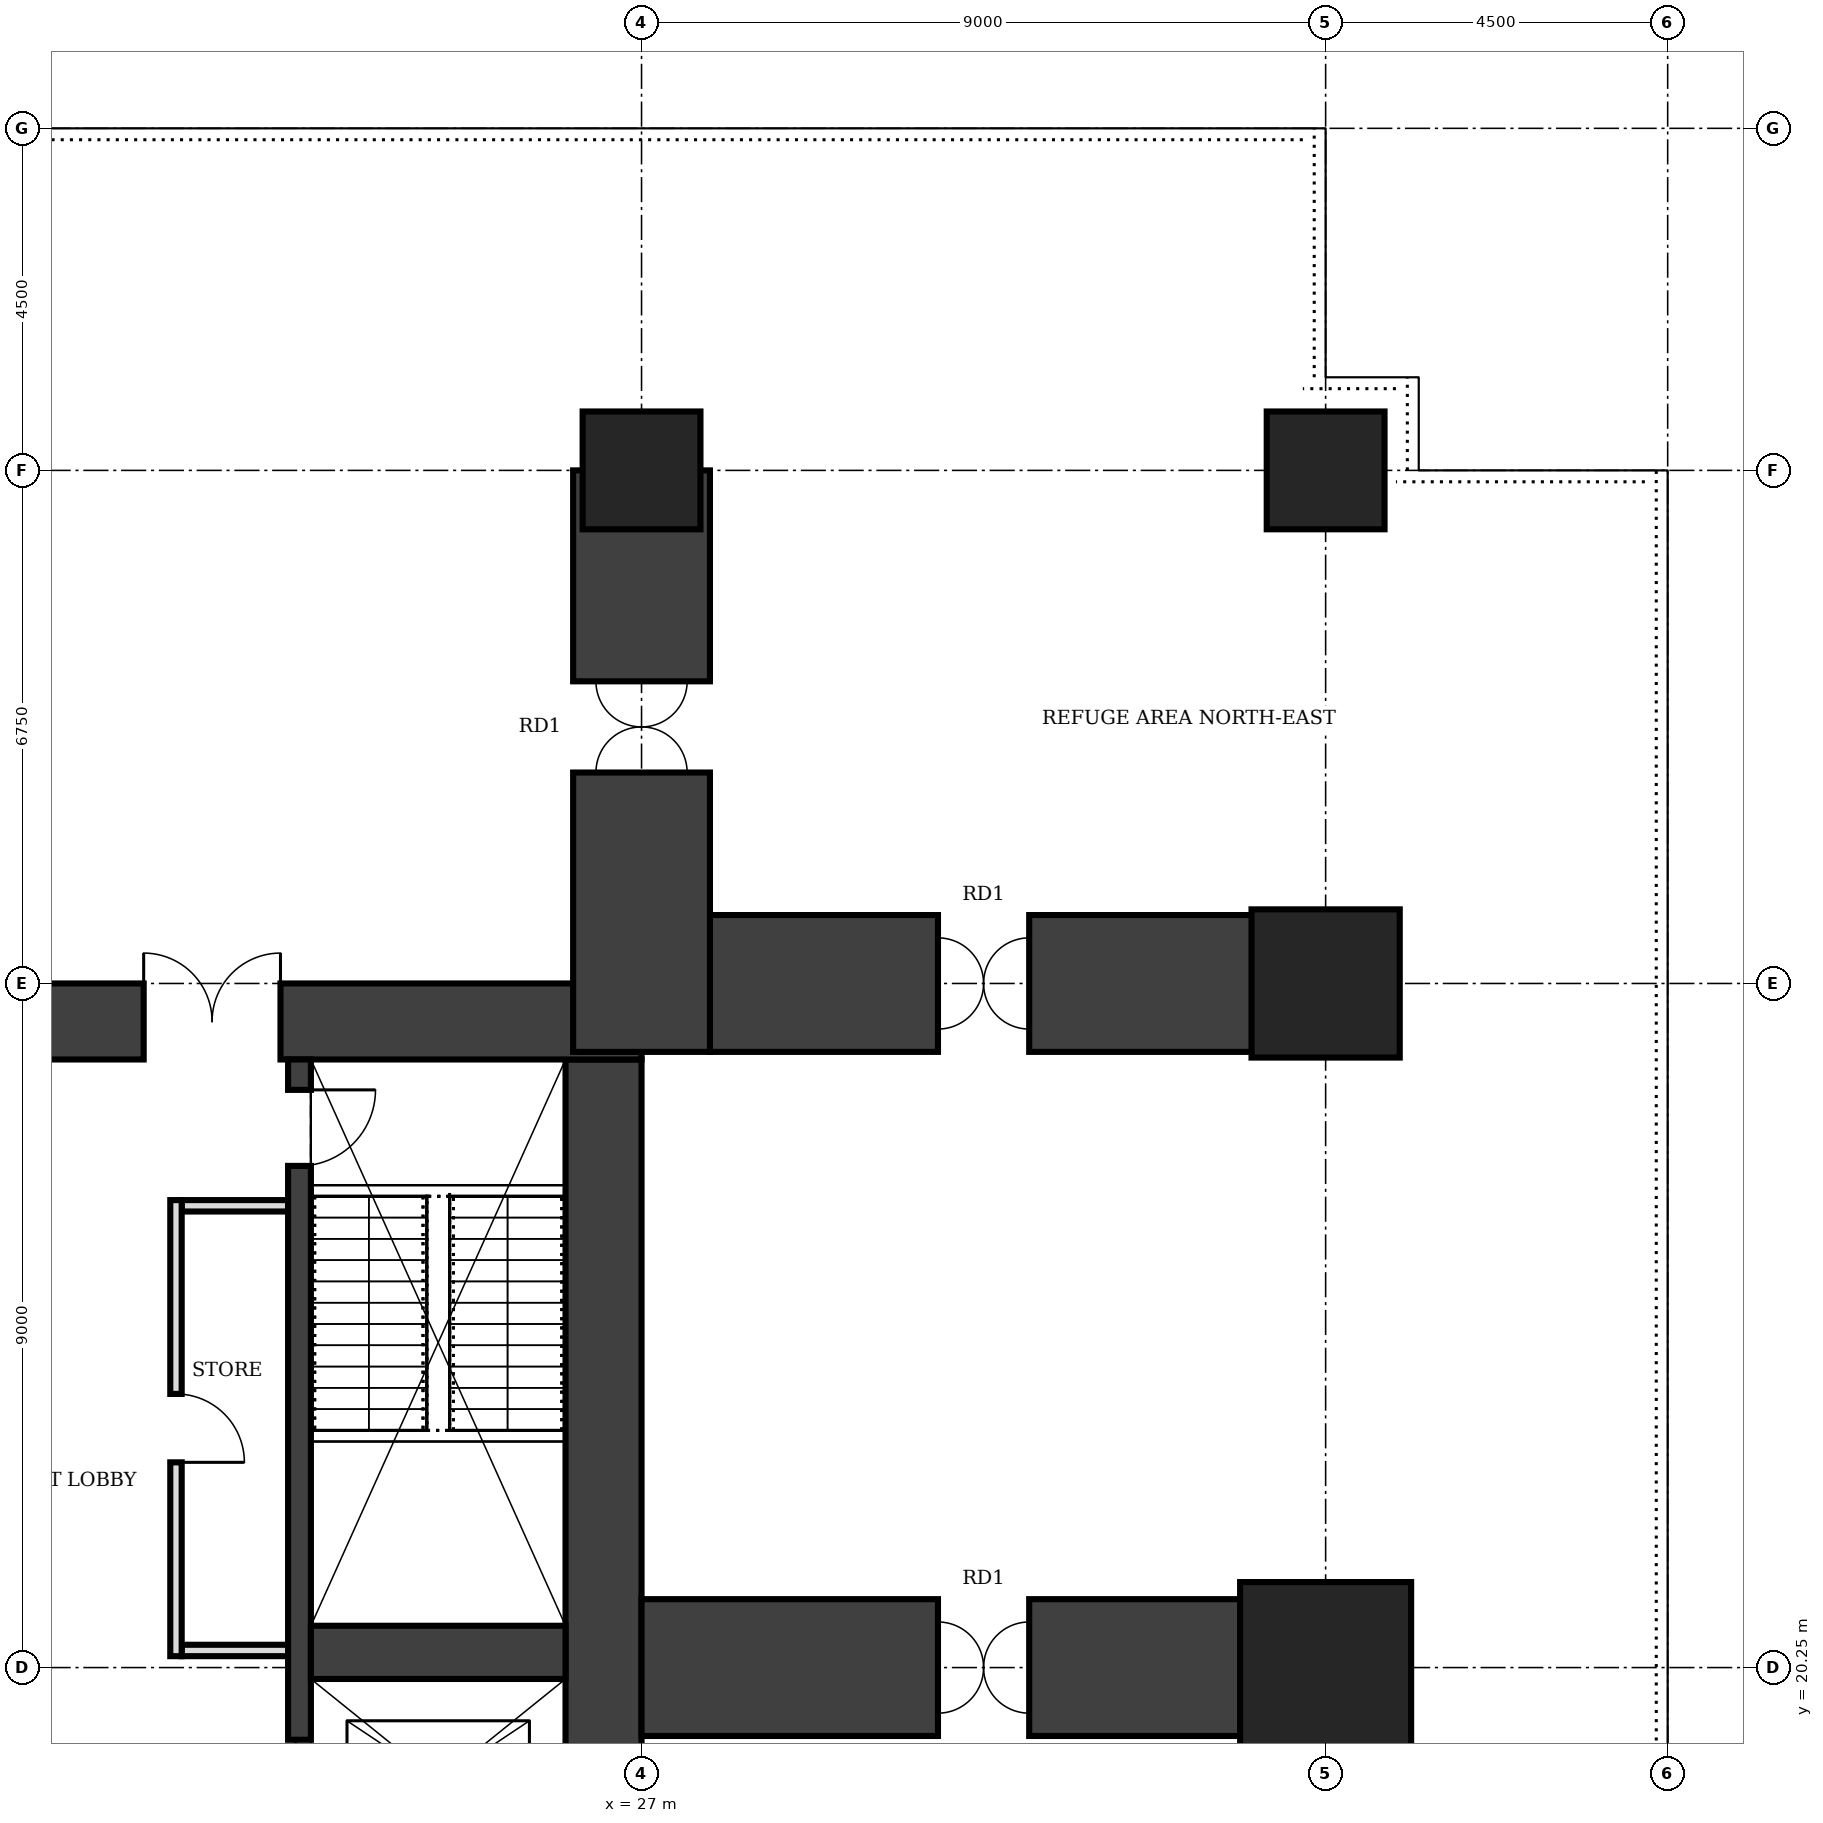
"""IFC4 building model, lengths in metres.
Left out: names, types, materials, properties, quantities, classifications, styles, units other than length and angle.
Written with IfcOpenShell. Run it as: python <this file> out.ifc"""

import sys

from ifc_helpers import new_model, si_unit, direction, frame, frame_2d, origin, origin_2d, place, context, subcontext, project, spatial, rectangle, extrude, element, fill, save


model = new_model("IFC4")
c1 = context("Model", 3, precision=1e-05, world=origin(), true_north=direction((0.0, 1.0)))
c2 = subcontext(c1, "Body", "Model", "MODEL_VIEW")
j1 = project(units=[si_unit("LENGTHUNIT", "METRE"), si_unit("PLANEANGLEUNIT", "RADIAN")], contexts=[c1])
p1 = place(None, origin())
s1 = spatial("IfcSite", under=j1, at=p1, CompositionType="ELEMENT")
p2 = place(p1, origin())
s2 = spatial("IfcBuilding", under=s1, at=p2, CompositionType="ELEMENT")
p3 = place(p2, frame((0.0, 0.0, 245.0)))
s3 = spatial("IfcBuildingStorey", under=s2, at=p3, CompositionType="ELEMENT", Elevation=245.0)
p4 = place(p3, frame((26.5, 12.25, 0.0), z_axis=(0.0, 0.0, 1.0), x_axis=(0.0, 1.0, 0.0)))
e1 = element("IfcWall", 1, at=p4, inside=s3, PredefinedType="SHEAR", context=c2, shape_type="SweptSolid", body=[
    extrude(rectangle(XDim=16.0, YDim=1.0, at=frame_2d((8.0, 0.0))), origin(), (0.0, 0.0, 1.0), 8.0),
])
p5 = place(p3, frame((27.0, 28.75, 0.0), z_axis=(0.0, 0.0, 1.0), x_axis=(-1.0, 0.0, 0.0)))
e2 = element("IfcWall", 2, at=p5, inside=s3, PredefinedType="SHEAR", context=c2, shape_type="SweptSolid", body=[
    extrude(rectangle(XDim=13.5, YDim=1.0, at=frame_2d((6.75, 0.0))), origin(), (0.0, 0.0, 1.0), 8.0),
])
p6 = place(p5, frame((4.75, 0.0, 0.0)))
e3 = element("IfcOpeningElement", 3, at=p6, cuts=e2, PredefinedType="OPENING", context=c2, shape_type="SweptSolid", body=[
    extrude(rectangle(XDim=1.8, YDim=2.1, at=frame_2d((0.9, 1.05))), frame((0.0, 0.51, 0.0), z_axis=(0.0, -1.0, 0.0), x_axis=(1.0, 0.0, 0.0)), (0.0, 0.0, 1.0), 1.02),
])
p7 = place(p3, frame((22.5, 12.25, 0.0), z_axis=(0.0, 0.0, 1.0), x_axis=(0.0, 1.0, 0.0)))
e4 = element("IfcWall", 4, at=p7, inside=s3, PredefinedType="SHEAR", context=c2, shape_type="SweptSolid", body=[
    extrude(rectangle(XDim=16.0, YDim=0.3, at=frame_2d((8.0, 0.0))), origin(), (0.0, 0.0, 1.0), 8.0),
])
p8 = place(p7, frame((14.6, 0.0, 0.0)))
e5 = element("IfcOpeningElement", 5, at=p8, cuts=e4, PredefinedType="OPENING", context=c2, shape_type="SweptSolid", body=[
    extrude(rectangle(XDim=1.0, YDim=2.1, at=frame_2d((0.5, 1.05))), frame((0.0, 0.16, 0.0), z_axis=(0.0, -1.0, 0.0), x_axis=(1.0, 0.0, 0.0)), (0.0, 0.0, 1.0), 0.32),
])
p9 = place(p7, frame((0.375, 0.0, 0.0)))
e6 = element("IfcOpeningElement", 6, at=p9, cuts=e4, PredefinedType="OPENING", context=c2, shape_type="SweptSolid", body=[
    extrude(rectangle(XDim=1.1, YDim=2.1, at=frame_2d((0.55, 1.05))), frame((0.0, 0.16, 0.0), z_axis=(0.0, -1.0, 0.0), x_axis=(1.0, 0.0, 0.0)), (0.0, 0.0, 1.0), 0.32),
])
p10 = place(p7, frame((3.7, 0.0, 0.0)))
e7 = element("IfcOpeningElement", 7, at=p10, cuts=e4, PredefinedType="OPENING", context=c2, shape_type="SweptSolid", body=[
    extrude(rectangle(XDim=1.1, YDim=2.1, at=frame_2d((0.55, 1.05))), frame((0.0, 0.16, 0.0), z_axis=(0.0, -1.0, 0.0), x_axis=(1.0, 0.0, 0.0)), (0.0, 0.0, 1.0), 0.32),
])
p11 = place(p7, frame((5.95, 0.0, 0.0)))
e8 = element("IfcOpeningElement", 8, at=p11, cuts=e4, PredefinedType="OPENING", context=c2, shape_type="SweptSolid", body=[
    extrude(rectangle(XDim=1.1, YDim=2.1, at=frame_2d((0.55, 1.05))), frame((0.0, 0.16, 0.0), z_axis=(0.0, -1.0, 0.0), x_axis=(1.0, 0.0, 0.0)), (0.0, 0.0, 1.0), 0.32),
])
p12 = place(p3, frame((22.65, 20.45, 0.0), z_axis=(0.0, 0.0, 1.0), x_axis=(1.0, 0.0, 0.0)))
e9 = element("IfcWall", 9, at=p12, inside=s3, PredefinedType="SHEAR", context=c2, shape_type="SweptSolid", body=[
    extrude(rectangle(XDim=3.35, YDim=0.7, at=frame_2d((1.675, 0.0))), origin(), (0.0, 0.0, 1.0), 8.0),
])
p13 = place(p3, frame((36.0, 20.25, 0.0), z_axis=(0.0, 0.0, 1.0), x_axis=(1.0, 0.0, 0.0)))
e10 = element("IfcColumn", 10, at=p13, inside=s3, PredefinedType="COLUMN", context=c2, shape_type="SweptSolid", body=[
    extrude(rectangle(XDim=2.25, YDim=2.25, at=origin_2d()), origin(), (0.0, 0.0, 1.0), 8.0),
])
p14 = place(p3, frame((36.0, 29.25, 0.0), z_axis=(0.0, 0.0, 1.0), x_axis=(1.0, 0.0, 0.0)))
e11 = element("IfcColumn", 11, at=p14, inside=s3, PredefinedType="COLUMN", context=c2, shape_type="SweptSolid", body=[
    extrude(rectangle(XDim=1.95, YDim=1.95, at=origin_2d()), origin(), (0.0, 0.0, 1.0), 8.0),
])
for number, where, z_axis, x_axis in (
    (12, (27.0, 36.0, 0.0), (0.0, 0.0, 1.0), (1.0, 0.0, 0.0)),
    (13, (36.0, 36.0, 0.0), (0.0, 0.0, 1.0), (1.0, 0.0, 0.0)),
):
    element("IfcColumn", number, at=place(p3, frame(where, z_axis=z_axis, x_axis=x_axis)), inside=s3, PredefinedType="COLUMN", context=c2, shape_type="SweptSolid", body=[
        extrude(rectangle(XDim=1.55, YDim=1.55, at=origin_2d()), origin(), (0.0, 0.0, 1.0), 8.0),
    ])
p15 = place(p3, frame((27.0, 28.35, 0.0), z_axis=(0.0, 0.0, 1.0), x_axis=(0.0, 1.0, 0.0)))
e14 = element("IfcWall", 14, at=p15, inside=s3, PredefinedType="SHEAR", context=c2, shape_type="SweptSolid", body=[
    extrude(rectangle(XDim=7.65, YDim=1.8, at=frame_2d((3.825, 0.0))), origin(), (0.0, 0.0, 1.0), 8.0),
])
p16 = place(p15, frame((3.675, 0.0, 0.0)))
e15 = element("IfcOpeningElement", 15, at=p16, cuts=e14, PredefinedType="OPENING", context=c2, shape_type="SweptSolid", body=[
    extrude(rectangle(XDim=1.2, YDim=2.1, at=frame_2d((0.6, 1.05))), frame((0.0, 0.91, 0.0), z_axis=(0.0, -1.0, 0.0), x_axis=(1.0, 0.0, 0.0)), (0.0, 0.0, 1.0), 1.82),
])
p17 = place(p3, frame((27.0, 20.25, 0.0), z_axis=(0.0, 0.0, 1.0), x_axis=(1.0, 0.0, 0.0)))
e16 = element("IfcWall", 16, at=p17, inside=s3, PredefinedType="SHEAR", context=c2, shape_type="SweptSolid", body=[
    extrude(rectangle(XDim=9.0, YDim=1.8, at=frame_2d((4.5, 0.0))), origin(), (0.0, 0.0, 1.0), 8.0),
])
p18 = place(p17, frame((3.9, 0.0, 0.0)))
e17 = element("IfcOpeningElement", 17, at=p18, cuts=e16, PredefinedType="OPENING", context=c2, shape_type="SweptSolid", body=[
    extrude(rectangle(XDim=1.2, YDim=2.1, at=frame_2d((0.6, 1.05))), frame((0.0, 0.91, 0.0), z_axis=(0.0, -1.0, 0.0), x_axis=(1.0, 0.0, 0.0)), (0.0, 0.0, 1.0), 1.82),
])
p19 = place(p3, frame((27.9, 29.25, 0.0), z_axis=(0.0, 0.0, 1.0), x_axis=(1.0, 0.0, 0.0)))
e18 = element("IfcWall", 18, at=p19, inside=s3, PredefinedType="SHEAR", context=c2, shape_type="SweptSolid", body=[
    extrude(rectangle(XDim=8.1, YDim=1.8, at=frame_2d((4.05, 0.0))), origin(), (0.0, 0.0, 1.0), 8.0),
])
p20 = place(p19, frame((3.0, 0.0, 0.0)))
e19 = element("IfcOpeningElement", 19, at=p20, cuts=e18, PredefinedType="OPENING", context=c2, shape_type="SweptSolid", body=[
    extrude(rectangle(XDim=1.2, YDim=2.1, at=frame_2d((0.6, 1.05))), frame((0.0, 0.91, 0.0), z_axis=(0.0, -1.0, 0.0), x_axis=(1.0, 0.0, 0.0)), (0.0, 0.0, 1.0), 1.82),
])
p21 = place(p3, frame((20.875, 20.4, 0.0), z_axis=(0.0, 0.0, 1.0), x_axis=(0.0, 1.0, 0.0)))
e20 = element("IfcWall", 20, at=p21, inside=s3, PredefinedType="PARTITIONING", context=c2, shape_type="SweptSolid", body=[
    extrude(rectangle(XDim=6.0, YDim=0.15, at=frame_2d((3.0, 0.0))), origin(), (0.0, 0.0, 1.0), 7.75),
])
p22 = place(p21, frame((2.55, 0.0, 0.0)))
e21 = element("IfcOpeningElement", 21, at=p22, cuts=e20, PredefinedType="OPENING", context=c2, shape_type="SweptSolid", body=[
    extrude(rectangle(XDim=0.9, YDim=2.1, at=frame_2d((0.45, 1.05))), frame((0.0, 0.085, 0.0), z_axis=(0.0, -1.0, 0.0), x_axis=(1.0, 0.0, 0.0)), (0.0, 0.0, 1.0), 0.17),
])
for number, where, z_axis, x_axis in (
    (22, (20.95, 20.475, 0.0), (0.0, 0.0, 1.0), (1.0, 0.0, 0.0)),
    (23, (20.95, 26.325, 0.0), (0.0, 0.0, 1.0), (1.0, 0.0, 0.0)),
):
    element("IfcWall", number, at=place(p3, frame(where, z_axis=z_axis, x_axis=x_axis)), inside=s3, PredefinedType="PARTITIONING", context=c2, shape_type="SweptSolid", body=[
        extrude(rectangle(XDim=1.4, YDim=0.15, at=frame_2d((0.7, 0.0))), origin(), (0.0, 0.0, 1.0), 7.75),
    ])
p23 = place(p6, frame((1.8, 0.0, 0.0), z_axis=(0.0, 0.0, 1.0), x_axis=(-1.0, 0.0, 0.0)))
e24 = element("IfcDoor", 24, at=p23, inside=s3, OperationType="DOUBLE_DOOR_SINGLE_SWING", PredefinedType="DOOR", context=c2, shape_type="SweptSolid", body=[
    extrude(rectangle(XDim=1.8, YDim=2.1, at=frame_2d((0.9, 1.05))), frame((0.0, 0.025, 0.0), z_axis=(0.0, -1.0, 0.0), x_axis=(1.0, 0.0, 0.0)), (0.0, 0.0, 1.0), 0.05),
])
fill(e3, e24)
p24 = place(p8, frame((1.0, 0.0, 0.0), z_axis=(0.0, 0.0, 1.0), x_axis=(-1.0, 0.0, 0.0)))
e25 = element("IfcDoor", 25, at=p24, inside=s3, OperationType="SINGLE_SWING_LEFT", PredefinedType="DOOR", context=c2, shape_type="SweptSolid", body=[
    extrude(rectangle(XDim=1.0, YDim=2.1, at=frame_2d((0.5, 1.05))), frame((0.0, 0.025, 0.0), z_axis=(0.0, -1.0, 0.0), x_axis=(1.0, 0.0, 0.0)), (0.0, 0.0, 1.0), 0.05),
])
fill(e5, e25)
p25 = place(p11, origin())
e26 = element("IfcDoor", 26, at=p25, inside=s3, OperationType="DOUBLE_DOOR_SLIDING", PredefinedType="DOOR", context=c2, shape_type="SweptSolid", body=[
    extrude(rectangle(XDim=1.1, YDim=2.1, at=frame_2d((0.55, 1.05))), frame((0.0, 0.025, 0.0), z_axis=(0.0, -1.0, 0.0), x_axis=(1.0, 0.0, 0.0)), (0.0, 0.0, 1.0), 0.05),
])
fill(e8, e26)
p26 = place(p22, frame((0.9, 0.0, 0.0), z_axis=(0.0, 0.0, 1.0), x_axis=(-1.0, 0.0, 0.0)))
e27 = element("IfcDoor", 27, at=p26, inside=s3, OperationType="SINGLE_SWING_RIGHT", PredefinedType="DOOR", context=c2, shape_type="SweptSolid", body=[
    extrude(rectangle(XDim=0.9, YDim=2.1, at=frame_2d((0.45, 1.05))), frame((0.0, 0.025, 0.0), z_axis=(0.0, -1.0, 0.0), x_axis=(1.0, 0.0, 0.0)), (0.0, 0.0, 1.0), 0.05),
])
fill(e21, e27)
p27 = place(p16, origin())
e28 = element("IfcDoor", 28, at=p27, inside=s3, OperationType="DOUBLE_DOOR_DOUBLE_SWING", PredefinedType="DOOR", context=c2, shape_type="SweptSolid", body=[
    extrude(rectangle(XDim=1.2, YDim=2.1, at=frame_2d((0.6, 1.05))), frame((0.0, 0.025, 0.0), z_axis=(0.0, -1.0, 0.0), x_axis=(1.0, 0.0, 0.0)), (0.0, 0.0, 1.0), 0.05),
])
fill(e15, e28)
p28 = place(p18, origin())
e29 = element("IfcDoor", 29, at=p28, inside=s3, OperationType="DOUBLE_DOOR_DOUBLE_SWING", PredefinedType="DOOR", context=c2, shape_type="SweptSolid", body=[
    extrude(rectangle(XDim=1.2, YDim=2.1, at=frame_2d((0.6, 1.05))), frame((0.0, 0.025, 0.0), z_axis=(0.0, -1.0, 0.0), x_axis=(1.0, 0.0, 0.0)), (0.0, 0.0, 1.0), 0.05),
])
fill(e17, e29)
p29 = place(p20, origin())
e30 = element("IfcDoor", 30, at=p29, inside=s3, OperationType="DOUBLE_DOOR_DOUBLE_SWING", PredefinedType="DOOR", context=c2, shape_type="SweptSolid", body=[
    extrude(rectangle(XDim=1.2, YDim=2.1, at=frame_2d((0.6, 1.05))), frame((0.0, 0.025, 0.0), z_axis=(0.0, -1.0, 0.0), x_axis=(1.0, 0.0, 0.0)), (0.0, 0.0, 1.0), 0.05),
])
fill(e19, e30)
save(model, sys.argv[1])
